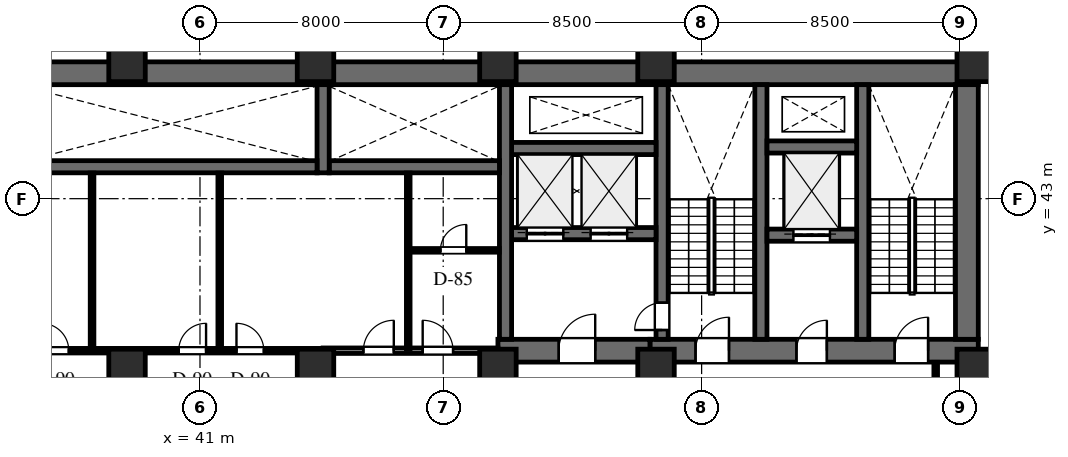
"""IFC4 building model, lengths in metres.
Left out: names, types, materials, properties, quantities, classifications, styles, units other than length and angle.
Written with IfcOpenShell. Run it as: python <this file> out.ifc"""

import sys

from ifc_helpers import new_model, si_unit, direction, frame, frame_2d, origin, origin_2d, place, context, subcontext, project, spatial, rectangle, extrude, element, fill, save


model = new_model("IFC4")
c1 = context("Model", 3, precision=1e-05, world=origin(), true_north=direction((0.0, 1.0)))
c2 = subcontext(c1, "Body", "Model", "MODEL_VIEW")
j1 = project(units=[si_unit("LENGTHUNIT", "METRE"), si_unit("PLANEANGLEUNIT", "RADIAN")], contexts=[c1])
p1 = place(None, origin())
s1 = spatial("IfcSite", under=j1, at=p1, CompositionType="ELEMENT")
p2 = place(p1, origin())
s2 = spatial("IfcBuilding", under=s1, at=p2, CompositionType="ELEMENT")
p3 = place(p2, frame((0.0, 0.0, 77.5)))
s3 = spatial("IfcBuildingStorey", under=s2, at=p3, CompositionType="ELEMENT", Elevation=77.5)
p4 = place(p3, frame((22.9, 47.125, 0.0), z_axis=(0.0, 0.0, 1.0), x_axis=(1.0, 0.0, 0.0)))
e1 = element("IfcWall", 1, at=p4, inside=s3, PredefinedType="SHEAR", context=c2, shape_type="SweptSolid", body=[
    extrude(rectangle(XDim=43.7, YDim=0.75, at=frame_2d((21.85, 0.0))), origin(), (0.0, 0.0, 1.0), 4.0),
])
p5 = place(p3, frame((55.8, 38.0, 0.0), z_axis=(0.0, 0.0, 1.0), x_axis=(1.0, 0.0, 0.0)))
e2 = element("IfcWall", 2, at=p5, inside=s3, PredefinedType="SHEAR", context=c2, shape_type="SweptSolid", body=[
    extrude(rectangle(XDim=10.8, YDim=0.75, at=frame_2d((5.4, 0.0))), origin(), (0.0, 0.0, 1.0), 4.0),
])
p6 = place(p5, frame((1.5, 0.0, 0.0)))
e3 = element("IfcOpeningElement", 3, at=p6, cuts=e2, PredefinedType="OPENING", context=c2, shape_type="SweptSolid", body=[
    extrude(rectangle(XDim=1.1, YDim=2.2, at=frame_2d((0.55, 1.1))), frame((0.0, 0.385, 0.0), z_axis=(0.0, -1.0, 0.0), x_axis=(1.0, 0.0, 0.0)), (0.0, 0.0, 1.0), 0.77),
])
p7 = place(p5, frame((4.82, 0.0, 0.0)))
e4 = element("IfcOpeningElement", 4, at=p7, cuts=e2, PredefinedType="OPENING", context=c2, shape_type="SweptSolid", body=[
    extrude(rectangle(XDim=1.0, YDim=2.15, at=frame_2d((0.5, 1.075))), frame((0.0, 0.385, 0.0), z_axis=(0.0, -1.0, 0.0), x_axis=(1.0, 0.0, 0.0)), (0.0, 0.0, 1.0), 0.77),
])
p8 = place(p5, frame((8.05, 0.0, 0.0)))
e5 = element("IfcOpeningElement", 5, at=p8, cuts=e2, PredefinedType="OPENING", context=c2, shape_type="SweptSolid", body=[
    extrude(rectangle(XDim=1.1, YDim=2.2, at=frame_2d((0.55, 1.1))), frame((0.0, 0.385, 0.0), z_axis=(0.0, -1.0, 0.0), x_axis=(1.0, 0.0, 0.0)), (0.0, 0.0, 1.0), 0.77),
])
p9 = place(p3, frame((66.225, 38.375, 0.0), z_axis=(0.0, 0.0, 1.0), x_axis=(0.0, 1.0, 0.0)))
e6 = element("IfcWall", 6, at=p9, inside=s3, PredefinedType="SHEAR", context=c2, shape_type="SweptSolid", body=[
    extrude(rectangle(XDim=8.375, YDim=0.75, at=frame_2d((4.188, 0.0))), origin(), (0.0, 0.0, 1.0), 4.0),
])
for number, where, z_axis, x_axis in (
    (7, (62.8, 38.375, 0.0), (0.0, 0.0, 1.0), (0.0, 1.0, 0.0)),
    (8, (59.45, 38.375, 0.0), (0.0, 0.0, 1.0), (0.0, 1.0, 0.0)),
):
    element("IfcWall", number, at=place(p3, frame(where, z_axis=z_axis, x_axis=x_axis)), inside=s3, PredefinedType="SHEAR", context=c2, shape_type="SweptSolid", body=[
        extrude(rectangle(XDim=8.375, YDim=0.4, at=frame_2d((4.188, 0.0))), origin(), (0.0, 0.0, 1.0), 4.0),
    ])
p10 = place(p3, frame((56.2, 38.375, 0.0), z_axis=(0.0, 0.0, 1.0), x_axis=(0.0, 1.0, 0.0)))
e9 = element("IfcWall", 9, at=p10, inside=s3, PredefinedType="SHEAR", context=c2, shape_type="SweptSolid", body=[
    extrude(rectangle(XDim=8.375, YDim=0.4, at=frame_2d((4.188, 0.0))), origin(), (0.0, 0.0, 1.0), 4.0),
])
p11 = place(p10, frame((0.305, 0.0, 0.0)))
e10 = element("IfcOpeningElement", 10, at=p11, cuts=e9, PredefinedType="OPENING", context=c2, shape_type="SweptSolid", body=[
    extrude(rectangle(XDim=0.9, YDim=2.15, at=frame_2d((0.45, 1.075))), frame((0.0, 0.21, 0.0), z_axis=(0.0, -1.0, 0.0), x_axis=(1.0, 0.0, 0.0)), (0.0, 0.0, 1.0), 0.42),
])
p12 = place(p3, frame((59.65, 41.8, 0.0), z_axis=(0.0, 0.0, 1.0), x_axis=(1.0, 0.0, 0.0)))
e11 = element("IfcWall", 11, at=p12, inside=s3, PredefinedType="SHEAR", context=c2, shape_type="SweptSolid", body=[
    extrude(rectangle(XDim=2.95, YDim=0.4, at=frame_2d((1.475, 0.0))), origin(), (0.0, 0.0, 1.0), 4.0),
])
p13 = place(p12, frame((0.87, 0.0, 0.0)))
e12 = element("IfcOpeningElement", 12, at=p13, cuts=e11, PredefinedType="OPENING", context=c2, shape_type="SweptSolid", body=[
    extrude(rectangle(XDim=1.2, YDim=2.2, at=frame_2d((0.6, 1.1))), frame((0.0, 0.21, 0.0), z_axis=(0.0, -1.0, 0.0), x_axis=(1.0, 0.0, 0.0)), (0.0, 0.0, 1.0), 0.42),
])
p14 = place(p3, frame((59.65, 44.7, 0.0), z_axis=(0.0, 0.0, 1.0), x_axis=(1.0, 0.0, 0.0)))
e13 = element("IfcWall", 13, at=p14, inside=s3, PredefinedType="SHEAR", context=c2, shape_type="SweptSolid", body=[
    extrude(rectangle(XDim=2.95, YDim=0.4, at=frame_2d((1.475, 0.0))), origin(), (0.0, 0.0, 1.0), 4.0),
])
p15 = place(p3, frame((50.8, 38.0, 0.0), z_axis=(0.0, 0.0, 1.0), x_axis=(1.0, 0.0, 0.0)))
e14 = element("IfcWall", 14, at=p15, inside=s3, PredefinedType="SHEAR", context=c2, shape_type="SweptSolid", body=[
    extrude(rectangle(XDim=5.0, YDim=0.75, at=frame_2d((2.5, 0.0))), origin(), (0.0, 0.0, 1.0), 4.0),
])
p16 = place(p15, frame((2.0, 0.0, 0.0)))
e15 = element("IfcOpeningElement", 15, at=p16, cuts=e14, PredefinedType="OPENING", context=c2, shape_type="SweptSolid", body=[
    extrude(rectangle(XDim=1.2, YDim=2.2, at=frame_2d((0.6, 1.1))), frame((0.0, 0.385, 0.0), z_axis=(0.0, -1.0, 0.0), x_axis=(1.0, 0.0, 0.0)), (0.0, 0.0, 1.0), 0.77),
])
p17 = place(p3, frame((51.25, 41.85, 0.0), z_axis=(0.0, 0.0, 1.0), x_axis=(1.0, 0.0, 0.0)))
e16 = element("IfcWall", 16, at=p17, inside=s3, PredefinedType="SHEAR", context=c2, shape_type="SweptSolid", body=[
    extrude(rectangle(XDim=4.75, YDim=0.4, at=frame_2d((2.375, 0.0))), origin(), (0.0, 0.0, 1.0), 4.0),
])
p18 = place(p17, frame((0.5, 0.0, 0.0)))
e17 = element("IfcOpeningElement", 17, at=p18, cuts=e16, PredefinedType="OPENING", context=c2, shape_type="SweptSolid", body=[
    extrude(rectangle(XDim=1.2, YDim=2.2, at=frame_2d((0.6, 1.1))), frame((0.0, 0.21, 0.0), z_axis=(0.0, -1.0, 0.0), x_axis=(1.0, 0.0, 0.0)), (0.0, 0.0, 1.0), 0.42),
])
p19 = place(p17, frame((2.6, 0.0, 0.0)))
e18 = element("IfcOpeningElement", 18, at=p19, cuts=e16, PredefinedType="OPENING", context=c2, shape_type="SweptSolid", body=[
    extrude(rectangle(XDim=1.2, YDim=2.2, at=frame_2d((0.6, 1.1))), frame((0.0, 0.21, 0.0), z_axis=(0.0, -1.0, 0.0), x_axis=(1.0, 0.0, 0.0)), (0.0, 0.0, 1.0), 0.42),
])
p20 = place(p3, frame((51.25, 44.65, 0.0), z_axis=(0.0, 0.0, 1.0), x_axis=(1.0, 0.0, 0.0)))
e19 = element("IfcWall", 19, at=p20, inside=s3, PredefinedType="SHEAR", context=c2, shape_type="SweptSolid", body=[
    extrude(rectangle(XDim=4.75, YDim=0.4, at=frame_2d((2.375, 0.0))), origin(), (0.0, 0.0, 1.0), 4.0),
])
p21 = place(p3, frame((51.05, 38.375, 0.0), z_axis=(0.0, 0.0, 1.0), x_axis=(0.0, 1.0, 0.0)))
e20 = element("IfcWall", 20, at=p21, inside=s3, PredefinedType="SHEAR", context=c2, shape_type="SweptSolid", body=[
    extrude(rectangle(XDim=8.375, YDim=0.4, at=frame_2d((4.188, 0.0))), origin(), (0.0, 0.0, 1.0), 4.0),
])
p22 = place(p3, frame((45.25, 44.05, 0.0), z_axis=(0.0, 0.0, 1.0), x_axis=(1.0, 0.0, 0.0)))
e21 = element("IfcWall", 21, at=p22, inside=s3, PredefinedType="SHEAR", context=c2, shape_type="SweptSolid", body=[
    extrude(rectangle(XDim=5.6, YDim=0.4, at=frame_2d((2.8, 0.0))), origin(), (0.0, 0.0, 1.0), 4.0),
])
p23 = place(p3, frame((45.05, 43.85, 0.0), z_axis=(0.0, 0.0, 1.0), x_axis=(0.0, 1.0, 0.0)))
e22 = element("IfcWall", 22, at=p23, inside=s3, PredefinedType="SHEAR", context=c2, shape_type="SweptSolid", body=[
    extrude(rectangle(XDim=2.9, YDim=0.4, at=frame_2d((1.45, 0.0))), origin(), (0.0, 0.0, 1.0), 4.0),
])
p24 = place(p3, frame((35.2, 44.05, 0.0), z_axis=(0.0, 0.0, 1.0), x_axis=(1.0, 0.0, 0.0)))
e23 = element("IfcWall", 23, at=p24, inside=s3, PredefinedType="SHEAR", context=c2, shape_type="SweptSolid", body=[
    extrude(rectangle(XDim=9.65, YDim=0.4, at=frame_2d((4.825, 0.0))), origin(), (0.0, 0.0, 1.0), 4.0),
])
for number, where, z_axis, x_axis in (
    (24, (66.5, 47.55, 0.0), (0.0, 0.0, 1.0), (1.0, 0.0, 0.0)),
    (25, (56.0, 47.55, 0.0), (0.0, 0.0, 1.0), (1.0, 0.0, 0.0)),
    (26, (66.5, 37.35, 0.0), (0.0, 0.0, 1.0), (1.0, 0.0, 0.0)),
    (27, (56.0, 37.35, 0.0), (0.0, 0.0, 1.0), (1.0, 0.0, 0.0)),
    (28, (50.8, 47.55, 0.0), (0.0, 0.0, 1.0), (1.0, 0.0, 0.0)),
    (29, (50.8, 37.35, 0.0), (0.0, 0.0, 1.0), (1.0, 0.0, 0.0)),
    (30, (44.8, 37.35, 0.0), (0.0, 0.0, 1.0), (1.0, 0.0, 0.0)),
    (31, (44.8, 47.55, 0.0), (0.0, 0.0, 1.0), (1.0, 0.0, 0.0)),
    (32, (38.6, 37.35, 0.0), (0.0, 0.0, 1.0), (1.0, 0.0, 0.0)),
    (33, (38.6, 47.55, 0.0), (0.0, 0.0, 1.0), (1.0, 0.0, 0.0)),
):
    element("IfcColumn", number, at=place(p3, frame(where, z_axis=z_axis, x_axis=x_axis)), inside=s3, PredefinedType="COLUMN", context=c2, shape_type="SweptSolid", body=[
        extrude(rectangle(XDim=1.2, YDim=1.4, at=origin_2d()), origin(), (0.0, 0.0, 1.0), 4.0),
    ])
p25 = place(p3, frame((68.375, 37.8, 0.0), z_axis=(0.0, 0.0, 1.0), x_axis=(-0.139174610616, -0.990267856572, 0.0)))
e34 = element("IfcWall", 34, at=p25, inside=s3, PredefinedType="STANDARD", context=c2, shape_type="SweptSolid", body=[
    extrude(rectangle(XDim=34.6, YDim=0.28, at=frame_2d((17.3, 0.0))), origin(), (0.0, 0.0, 1.0), 3.74),
])
p26 = place(p25, frame((8.036, 0.0, 0.0)))
e35 = element("IfcOpeningElement", 35, at=p26, cuts=e34, PredefinedType="OPENING", context=c2, shape_type="SweptSolid", body=[
    extrude(rectangle(XDim=1.0, YDim=2.15, at=frame_2d((0.5, 1.075))), frame((0.0, 0.15, 0.0), z_axis=(0.0, -1.0, 0.0), x_axis=(1.0, 0.0, 0.0)), (0.0, 0.0, 1.0), 0.3),
])
p27 = place(p25, frame((3.852, 0.0, 0.65)))
e36 = element("IfcOpeningElement", 36, at=p27, cuts=e34, PredefinedType="OPENING", context=c2, shape_type="SweptSolid", body=[
    extrude(rectangle(XDim=1.8, YDim=2.1, at=frame_2d((0.9, 1.05))), frame((0.0, 0.15, 0.0), z_axis=(0.0, -1.0, 0.0), x_axis=(1.0, 0.0, 0.0)), (0.0, 0.0, 1.0), 0.3),
])
p28 = place(p25, frame((20.663, 0.0, 0.65)))
e37 = element("IfcOpeningElement", 37, at=p28, cuts=e34, PredefinedType="OPENING", context=c2, shape_type="SweptSolid", body=[
    extrude(rectangle(XDim=1.8, YDim=2.1, at=frame_2d((0.9, 1.05))), frame((0.0, 0.15, 0.0), z_axis=(0.0, -1.0, 0.0), x_axis=(1.0, 0.0, 0.0)), (0.0, 0.0, 1.0), 0.3),
])
p29 = place(p3, frame((45.05, 38.0, 0.0), z_axis=(0.0, 0.0, 1.0), x_axis=(1.0, 0.0, 0.0)))
e38 = element("IfcWall", 38, at=p29, inside=s3, PredefinedType="STANDARD", context=c2, shape_type="SweptSolid", body=[
    extrude(rectangle(XDim=5.75, YDim=0.18, at=frame_2d((2.875, 0.0))), origin(), (0.0, 0.0, 1.0), 2.813),
])
p30 = place(p29, frame((1.325, 0.0, 0.0)))
e39 = element("IfcOpeningElement", 39, at=p30, cuts=e38, PredefinedType="OPENING", context=c2, shape_type="SweptSolid", body=[
    extrude(rectangle(XDim=1.0, YDim=2.15, at=frame_2d((0.5, 1.075))), frame((0.0, 0.1, 0.0), z_axis=(0.0, -1.0, 0.0), x_axis=(1.0, 0.0, 0.0)), (0.0, 0.0, 1.0), 0.2),
])
p31 = place(p29, frame((3.275, 0.0, 0.0)))
e40 = element("IfcOpeningElement", 40, at=p31, cuts=e38, PredefinedType="OPENING", context=c2, shape_type="SweptSolid", body=[
    extrude(rectangle(XDim=1.0, YDim=2.15, at=frame_2d((0.5, 1.075))), frame((0.0, 0.1, 0.0), z_axis=(0.0, -1.0, 0.0), x_axis=(1.0, 0.0, 0.0)), (0.0, 0.0, 1.0), 0.2),
])
p32 = place(p3, frame((47.85, 38.068, 0.0), z_axis=(0.0, 0.0, 1.0), x_axis=(0.0, 1.0, 0.0)))
e41 = element("IfcWall", 41, at=p32, inside=s3, PredefinedType="PARTITIONING", context=c2, shape_type="SweptSolid", body=[
    extrude(rectangle(XDim=5.774, YDim=0.12, at=frame_2d((2.887, 0.0))), origin(), (0.0, 0.0, 1.0), 3.74),
])
p33 = place(p3, frame((47.918, 41.3, 0.0), z_axis=(0.0, 0.0, 1.0), x_axis=(1.0, 0.0, 0.0)))
e42 = element("IfcWall", 42, at=p33, inside=s3, PredefinedType="PARTITIONING", context=c2, shape_type="SweptSolid", body=[
    extrude(rectangle(XDim=2.924, YDim=0.12, at=frame_2d((1.462, 0.0))), origin(), (0.0, 0.0, 1.0), 2.813),
])
p34 = place(p33, frame((0.991, 0.0, 0.0)))
e43 = element("IfcOpeningElement", 43, at=p34, cuts=e42, PredefinedType="OPENING", context=c2, shape_type="SweptSolid", body=[
    extrude(rectangle(XDim=0.85, YDim=2.1, at=frame_2d((0.425, 1.05))), frame((0.0, 0.07, 0.0), z_axis=(0.0, -1.0, 0.0), x_axis=(1.0, 0.0, 0.0)), (0.0, 0.0, 1.0), 0.14),
])
p35 = place(p3, frame((35.0, 38.0, 0.0), z_axis=(0.0, 0.0, 1.0), x_axis=(1.0, 0.0, 0.0)))
e44 = element("IfcWall", 44, at=p35, inside=s3, PredefinedType="PARTITIONING", context=c2, shape_type="SweptSolid", body=[
    extrude(rectangle(XDim=10.05, YDim=0.15, at=frame_2d((5.025, 0.0))), origin(), (0.0, 0.0, 1.0), 2.813),
])
p36 = place(p35, frame((0.785, 0.0, 0.0)))
e45 = element("IfcOpeningElement", 45, at=p36, cuts=e44, PredefinedType="OPENING", context=c2, shape_type="SweptSolid", body=[
    extrude(rectangle(XDim=0.9, YDim=2.1, at=frame_2d((0.45, 1.05))), frame((0.0, 0.085, 0.0), z_axis=(0.0, -1.0, 0.0), x_axis=(1.0, 0.0, 0.0)), (0.0, 0.0, 1.0), 0.17),
])
p37 = place(p35, frame((5.3, 0.0, 0.0)))
e46 = element("IfcOpeningElement", 46, at=p37, cuts=e44, PredefinedType="OPENING", context=c2, shape_type="SweptSolid", body=[
    extrude(rectangle(XDim=0.9, YDim=2.1, at=frame_2d((0.45, 1.05))), frame((0.0, 0.085, 0.0), z_axis=(0.0, -1.0, 0.0), x_axis=(1.0, 0.0, 0.0)), (0.0, 0.0, 1.0), 0.17),
])
p38 = place(p35, frame((7.2, 0.0, 0.0)))
e47 = element("IfcOpeningElement", 47, at=p38, cuts=e44, PredefinedType="OPENING", context=c2, shape_type="SweptSolid", body=[
    extrude(rectangle(XDim=0.9, YDim=2.1, at=frame_2d((0.45, 1.05))), frame((0.0, 0.085, 0.0), z_axis=(0.0, -1.0, 0.0), x_axis=(1.0, 0.0, 0.0)), (0.0, 0.0, 1.0), 0.17),
])
for number, where, z_axis, x_axis in (
    (48, (37.45, 38.068, 0.0), (0.0, 0.0, 1.0), (0.0, 1.0, 0.0)),
    (49, (41.65, 38.068, 0.0), (0.0, 0.0, 1.0), (0.0, 1.0, 0.0)),
):
    element("IfcWall", number, at=place(p3, frame(where, z_axis=z_axis, x_axis=x_axis)), inside=s3, PredefinedType="PARTITIONING", context=c2, shape_type="SweptSolid", body=[
        extrude(rectangle(XDim=5.774, YDim=0.12, at=frame_2d((2.887, 0.0))), origin(), (0.0, 0.0, 1.0), 3.74),
    ])
p39 = place(p3, frame((65.2, 34.4, 0.0), z_axis=(0.0, 0.0, 1.0), x_axis=(0.0, 1.0, 0.0)))
e50 = element("IfcWall", 50, at=p39, inside=s3, PredefinedType="PARTITIONING", context=c2, shape_type="SweptSolid", body=[
    extrude(rectangle(XDim=3.217, YDim=0.12, at=frame_2d((1.608, 0.0))), origin(), (0.0, 0.0, 1.0), 2.813),
])
p40 = place(p6, origin())
e51 = element("IfcDoor", 51, at=p40, inside=s3, OperationType="SINGLE_SWING_RIGHT", PredefinedType="DOOR", context=c2, shape_type="SweptSolid", body=[
    extrude(rectangle(XDim=1.1, YDim=2.2, at=frame_2d((0.55, 1.1))), frame((0.0, 0.025, 0.0), z_axis=(0.0, -1.0, 0.0), x_axis=(1.0, 0.0, 0.0)), (0.0, 0.0, 1.0), 0.05),
])
fill(e3, e51)
p41 = place(p7, origin())
e52 = element("IfcDoor", 52, at=p41, inside=s3, OperationType="SINGLE_SWING_RIGHT", PredefinedType="DOOR", context=c2, shape_type="SweptSolid", body=[
    extrude(rectangle(XDim=1.0, YDim=2.15, at=frame_2d((0.5, 1.075))), frame((0.0, 0.025, 0.0), z_axis=(0.0, -1.0, 0.0), x_axis=(1.0, 0.0, 0.0)), (0.0, 0.0, 1.0), 0.05),
])
fill(e4, e52)
p42 = place(p8, origin())
e53 = element("IfcDoor", 53, at=p42, inside=s3, OperationType="SINGLE_SWING_RIGHT", PredefinedType="DOOR", context=c2, shape_type="SweptSolid", body=[
    extrude(rectangle(XDim=1.1, YDim=2.2, at=frame_2d((0.55, 1.1))), frame((0.0, 0.025, 0.0), z_axis=(0.0, -1.0, 0.0), x_axis=(1.0, 0.0, 0.0)), (0.0, 0.0, 1.0), 0.05),
])
fill(e5, e53)
p43 = place(p16, origin())
e54 = element("IfcDoor", 54, at=p43, inside=s3, OperationType="SINGLE_SWING_RIGHT", PredefinedType="DOOR", context=c2, shape_type="SweptSolid", body=[
    extrude(rectangle(XDim=1.2, YDim=2.2, at=frame_2d((0.6, 1.1))), frame((0.0, 0.025, 0.0), z_axis=(0.0, -1.0, 0.0), x_axis=(1.0, 0.0, 0.0)), (0.0, 0.0, 1.0), 0.05),
])
fill(e15, e54)
p44 = place(p11, origin())
e55 = element("IfcDoor", 55, at=p44, inside=s3, OperationType="SINGLE_SWING_LEFT", PredefinedType="DOOR", context=c2, shape_type="SweptSolid", body=[
    extrude(rectangle(XDim=0.9, YDim=2.15, at=frame_2d((0.45, 1.075))), frame((0.0, 0.025, 0.0), z_axis=(0.0, -1.0, 0.0), x_axis=(1.0, 0.0, 0.0)), (0.0, 0.0, 1.0), 0.05),
])
fill(e10, e55)
p45 = place(p18, origin())
e56 = element("IfcDoor", 56, at=p45, inside=s3, OperationType="DOUBLE_DOOR_SLIDING", PredefinedType="DOOR", context=c2, shape_type="SweptSolid", body=[
    extrude(rectangle(XDim=1.2, YDim=2.2, at=frame_2d((0.6, 1.1))), frame((0.0, 0.025, 0.0), z_axis=(0.0, -1.0, 0.0), x_axis=(1.0, 0.0, 0.0)), (0.0, 0.0, 1.0), 0.05),
])
fill(e17, e56)
p46 = place(p19, origin())
e57 = element("IfcDoor", 57, at=p46, inside=s3, OperationType="DOUBLE_DOOR_SLIDING", PredefinedType="DOOR", context=c2, shape_type="SweptSolid", body=[
    extrude(rectangle(XDim=1.2, YDim=2.2, at=frame_2d((0.6, 1.1))), frame((0.0, 0.025, 0.0), z_axis=(0.0, -1.0, 0.0), x_axis=(1.0, 0.0, 0.0)), (0.0, 0.0, 1.0), 0.05),
])
fill(e18, e57)
p47 = place(p13, origin())
e58 = element("IfcDoor", 58, at=p47, inside=s3, OperationType="DOUBLE_DOOR_SLIDING", PredefinedType="DOOR", context=c2, shape_type="SweptSolid", body=[
    extrude(rectangle(XDim=1.2, YDim=2.2, at=frame_2d((0.6, 1.1))), frame((0.0, 0.025, 0.0), z_axis=(0.0, -1.0, 0.0), x_axis=(1.0, 0.0, 0.0)), (0.0, 0.0, 1.0), 0.05),
])
fill(e12, e58)
p48 = place(p30, origin())
e59 = element("IfcDoor", 59, at=p48, inside=s3, OperationType="SINGLE_SWING_RIGHT", PredefinedType="DOOR", context=c2, shape_type="SweptSolid", body=[
    extrude(rectangle(XDim=1.0, YDim=2.15, at=frame_2d((0.5, 1.075))), frame((0.0, 0.025, 0.0), z_axis=(0.0, -1.0, 0.0), x_axis=(1.0, 0.0, 0.0)), (0.0, 0.0, 1.0), 0.05),
])
fill(e39, e59)
p49 = place(p31, origin())
e60 = element("IfcDoor", 60, at=p49, inside=s3, OperationType="SINGLE_SWING_LEFT", PredefinedType="DOOR", context=c2, shape_type="SweptSolid", body=[
    extrude(rectangle(XDim=1.0, YDim=2.15, at=frame_2d((0.5, 1.075))), frame((0.0, 0.025, 0.0), z_axis=(0.0, -1.0, 0.0), x_axis=(1.0, 0.0, 0.0)), (0.0, 0.0, 1.0), 0.05),
])
fill(e40, e60)
p50 = place(p34, origin())
e61 = element("IfcDoor", 61, at=p50, inside=s3, OperationType="SINGLE_SWING_RIGHT", PredefinedType="DOOR", context=c2, shape_type="SweptSolid", body=[
    extrude(rectangle(XDim=0.85, YDim=2.1, at=frame_2d((0.425, 1.05))), frame((0.0, 0.025, 0.0), z_axis=(0.0, -1.0, 0.0), x_axis=(1.0, 0.0, 0.0)), (0.0, 0.0, 1.0), 0.05),
])
fill(e43, e61)
p51 = place(p36, origin())
e62 = element("IfcDoor", 62, at=p51, inside=s3, OperationType="SINGLE_SWING_LEFT", PredefinedType="DOOR", context=c2, shape_type="SweptSolid", body=[
    extrude(rectangle(XDim=0.9, YDim=2.1, at=frame_2d((0.45, 1.05))), frame((0.0, 0.025, 0.0), z_axis=(0.0, -1.0, 0.0), x_axis=(1.0, 0.0, 0.0)), (0.0, 0.0, 1.0), 0.05),
])
fill(e45, e62)
p52 = place(p37, origin())
e63 = element("IfcDoor", 63, at=p52, inside=s3, OperationType="SINGLE_SWING_RIGHT", PredefinedType="DOOR", context=c2, shape_type="SweptSolid", body=[
    extrude(rectangle(XDim=0.9, YDim=2.1, at=frame_2d((0.45, 1.05))), frame((0.0, 0.025, 0.0), z_axis=(0.0, -1.0, 0.0), x_axis=(1.0, 0.0, 0.0)), (0.0, 0.0, 1.0), 0.05),
])
fill(e46, e63)
p53 = place(p38, origin())
e64 = element("IfcDoor", 64, at=p53, inside=s3, OperationType="SINGLE_SWING_LEFT", PredefinedType="DOOR", context=c2, shape_type="SweptSolid", body=[
    extrude(rectangle(XDim=0.9, YDim=2.1, at=frame_2d((0.45, 1.05))), frame((0.0, 0.025, 0.0), z_axis=(0.0, -1.0, 0.0), x_axis=(1.0, 0.0, 0.0)), (0.0, 0.0, 1.0), 0.05),
])
fill(e47, e64)
save(model, sys.argv[1])
